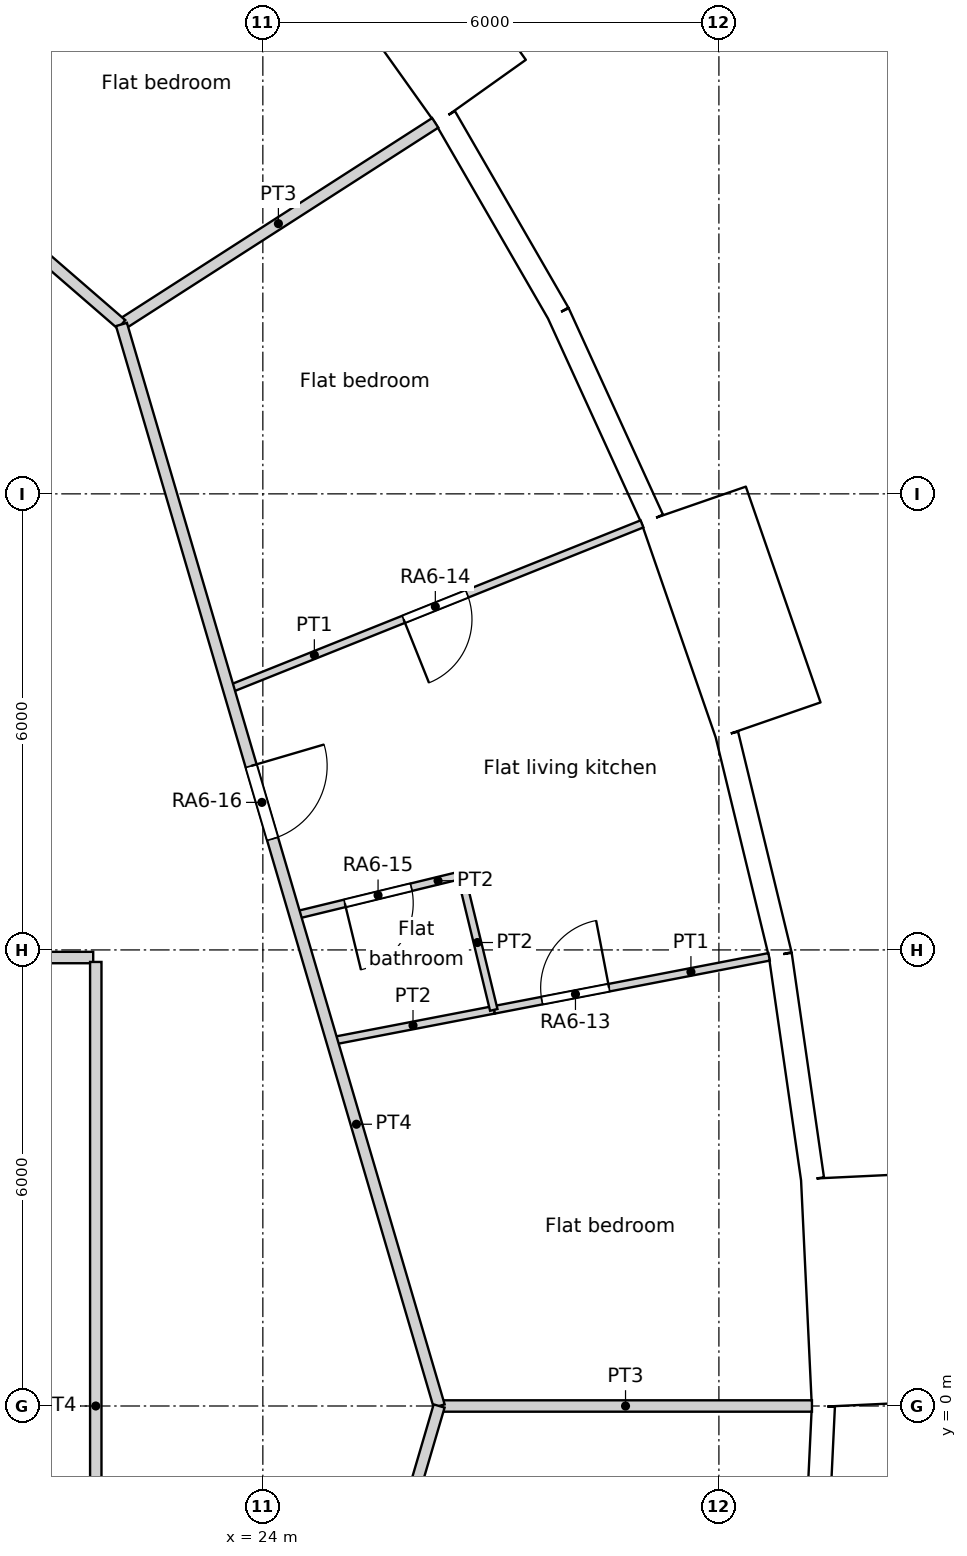
"""IFC4 building model, lengths in metres.
Left out: names, types, materials, properties, quantities, classifications, styles, units other than length and angle.
Written with IfcOpenShell. Run it as: python <this file> out.ifc"""

import sys

from ifc_helpers import new_model, si_unit, direction, frame, frame_2d, origin, origin_2d, place, context, subcontext, project, spatial, rectangle, circle, extrude, element, fill, save


model = new_model("IFC4")
c1 = context("Model", 3, precision=1e-05, world=origin(), true_north=direction((0.0, 1.0)))
c2 = subcontext(c1, "Body", "Model", "MODEL_VIEW")
j1 = project(units=[si_unit("LENGTHUNIT", "METRE"), si_unit("PLANEANGLEUNIT", "RADIAN")], contexts=[c1])
p1 = place(None, origin())
s1 = spatial("IfcSite", under=j1, at=p1, CompositionType="ELEMENT")
p2 = place(p1, origin())
s2 = spatial("IfcBuilding", under=s1, at=p2, CompositionType="ELEMENT")
p3 = place(p2, frame((0.0, 0.0, 82.2)))
s3 = spatial("IfcBuildingStorey", under=s2, at=p3, CompositionType="ELEMENT", Elevation=82.2)
for number, where, z_axis, x_axis in (
    (1, (30.275, 0.0, 0.0), (0.0, 0.0, 1.0), (1.0, 0.0, 0.0)),
    (2, (29.728, 5.729, 0.0), (0.0, 0.0, 1.0), (1.0, 0.0, 0.0)),
    (3, (28.106, 11.252, 0.0), (0.0, 0.0, 1.0), (1.0, 0.0, 0.0)),
    (4, (25.469, 16.368, 0.0), (0.0, 0.0, 1.0), (1.0, 0.0, 0.0)),
):
    element("IfcColumn", number, at=place(p3, frame(where, z_axis=z_axis, x_axis=x_axis)), inside=s3, PredefinedType="COLUMN", context=c2, shape_type="SweptSolid", body=[
        extrude(circle(Radius=0.6, at=origin_2d()), origin(), (0.0, 0.0, 1.0), 3.6),
    ])
for number, where, z_axis, x_axis in (
    (5, (24.548, 0.0, 0.0), (0.0, 0.0, 1.0), (1.0, 0.0, 0.0)),
    (6, (23.886, 5.661, 0.0), (0.0, 0.0, 1.0), (1.0, 0.0, 0.0)),
    (7, (21.937, 11.017, 0.0), (0.0, 0.0, 1.0), (1.0, 0.0, 0.0)),
):
    element("IfcColumn", number, at=place(p3, frame(where, z_axis=z_axis, x_axis=x_axis)), inside=s3, PredefinedType="COLUMN", context=c2, shape_type="SweptSolid", body=[
        extrude(circle(Radius=0.65, at=origin_2d()), origin(), (0.0, 0.0, 1.0), 3.6),
    ])
p4 = place(p3, frame((31.949, 0.02, -0.45), z_axis=(0.0, 0.0, 1.0), x_axis=(-0.047607680889, 0.998866111509, 0.0)))
e8 = element("IfcWall", 8, at=p4, inside=s3, PredefinedType="ELEMENTEDWALL", context=c2, shape_type="SweptSolid", body=[
    extrude(rectangle(XDim=3.0, YDim=1.45, at=frame_2d((1.5, 0.0))), origin(), (0.0, 0.0, 1.0), 3.6),
])
p5 = place(p4, frame((1.5, 0.0, 2.0)))
e9 = element("IfcOpeningElement", 9, at=p5, cuts=e8, PredefinedType="OPENING", context=c2, shape_type="SweptSolid", body=[
    extrude(circle(Radius=0.9, at=origin_2d()), frame((0.0, 0.735, 0.0), z_axis=(0.0, -1.0, 0.0), x_axis=(1.0, 0.0, 0.0)), (0.0, 0.0, 1.0), 1.47),
])
p6 = place(p3, frame((31.231, 2.988, 0.0), z_axis=(0.0, 0.0, 1.0), x_axis=(-0.142315996627, 0.989821275334, 0.0)))
e10 = element("IfcWall", 10, at=p6, inside=s3, PredefinedType="SOLIDWALL", context=c2, shape_type="SweptSolid", body=[
    extrude(rectangle(XDim=2.98, YDim=0.3, at=frame_2d((1.49, 0.0))), origin(), (0.0, 0.0, 1.0), 3.15),
])
p7 = place(p6, frame((1.49, 0.0, 1.55)))
e11 = element("IfcOpeningElement", 11, at=p7, cuts=e10, PredefinedType="OPENING", context=c2, shape_type="SweptSolid", body=[
    extrude(circle(Radius=0.9, at=origin_2d()), frame((0.0, 0.16, 0.0), z_axis=(0.0, -1.0, 0.0), x_axis=(1.0, 0.0, 0.0)), (0.0, 0.0, 1.0), 0.32),
])
p8 = place(p3, frame((30.807, 5.938, 0.0), z_axis=(0.0, 0.0, 1.0), x_axis=(-0.235743081534, 0.971815414319, 0.0)))
e12 = element("IfcWall", 12, at=p8, inside=s3, PredefinedType="SOLIDWALL", context=c2, shape_type="SweptSolid", body=[
    extrude(rectangle(XDim=2.979, YDim=0.3, at=frame_2d((1.49, 0.0))), origin(), (0.0, 0.0, 1.0), 3.15),
])
p9 = place(p8, frame((1.49, 0.0, 1.55)))
e13 = element("IfcOpeningElement", 13, at=p9, cuts=e12, PredefinedType="OPENING", context=c2, shape_type="SweptSolid", body=[
    extrude(circle(Radius=0.9, at=origin_2d()), frame((0.0, 0.16, 0.0), z_axis=(0.0, -1.0, 0.0), x_axis=(1.0, 0.0, 0.0)), (0.0, 0.0, 1.0), 0.32),
])
p10 = place(p3, frame((30.649, 9.021, -0.45), z_axis=(0.0, 0.0, 1.0), x_axis=(-0.327071431777, 0.944999618262, 0.0)))
e14 = element("IfcWall", 14, at=p10, inside=s3, PredefinedType="ELEMENTEDWALL", context=c2, shape_type="SweptSolid", body=[
    extrude(rectangle(XDim=3.0, YDim=1.45, at=frame_2d((1.5, 0.0))), origin(), (0.0, 0.0, 1.0), 3.6),
])
p11 = place(p10, frame((1.5, 0.0, 2.0)))
e15 = element("IfcOpeningElement", 15, at=p11, cuts=e14, PredefinedType="OPENING", context=c2, shape_type="SweptSolid", body=[
    extrude(circle(Radius=0.9, at=origin_2d()), frame((0.0, 0.735, 0.0), z_axis=(0.0, -1.0, 0.0), x_axis=(1.0, 0.0, 0.0)), (0.0, 0.0, 1.0), 1.47),
])
p12 = place(p3, frame((29.125, 11.666, 0.0), z_axis=(0.0, 0.0, 1.0), x_axis=(-0.415407317162, 0.909635509888, 0.0)))
e16 = element("IfcWall", 16, at=p12, inside=s3, PredefinedType="SOLIDWALL", context=c2, shape_type="SweptSolid", body=[
    extrude(rectangle(XDim=2.98, YDim=0.3, at=frame_2d((1.49, 0.0))), origin(), (0.0, 0.0, 1.0), 3.15),
])
p13 = place(p12, frame((1.49, 0.0, 1.55)))
e17 = element("IfcOpeningElement", 17, at=p13, cuts=e16, PredefinedType="OPENING", context=c2, shape_type="SweptSolid", body=[
    extrude(circle(Radius=0.9, at=origin_2d()), frame((0.0, 0.16, 0.0), z_axis=(0.0, -1.0, 0.0), x_axis=(1.0, 0.0, 0.0)), (0.0, 0.0, 1.0), 0.32),
])
p14 = place(p3, frame((27.887, 14.377, 0.0), z_axis=(0.0, 0.0, 1.0), x_axis=(-0.499999078476, 0.866025935826, 0.0)))
e18 = element("IfcWall", 18, at=p14, inside=s3, PredefinedType="SOLIDWALL", context=c2, shape_type="SweptSolid", body=[
    extrude(rectangle(XDim=2.979, YDim=0.3, at=frame_2d((1.49, 0.0))), origin(), (0.0, 0.0, 1.0), 3.15),
])
p15 = place(p14, frame((1.49, 0.0, 1.55)))
e19 = element("IfcOpeningElement", 19, at=p15, cuts=e18, PredefinedType="OPENING", context=c2, shape_type="SweptSolid", body=[
    extrude(circle(Radius=0.9, at=origin_2d()), frame((0.0, 0.16, 0.0), z_axis=(0.0, -1.0, 0.0), x_axis=(1.0, 0.0, 0.0)), (0.0, 0.0, 1.0), 0.32),
])
p16 = place(p3, frame((26.866, 17.29, -0.45), z_axis=(0.0, 0.0, 1.0), x_axis=(-0.580090570606, 0.814551981088, 0.0)))
e20 = element("IfcWall", 20, at=p16, inside=s3, PredefinedType="ELEMENTEDWALL", context=c2, shape_type="SweptSolid", body=[
    extrude(rectangle(XDim=3.0, YDim=1.45, at=frame_2d((1.5, 0.0))), origin(), (0.0, 0.0, 1.0), 3.6),
])
p17 = place(p16, frame((1.5, 0.0, 2.0)))
e21 = element("IfcOpeningElement", 21, at=p17, cuts=e20, PredefinedType="OPENING", context=c2, shape_type="SweptSolid", body=[
    extrude(circle(Radius=0.9, at=origin_2d()), frame((0.0, 0.735, 0.0), z_axis=(0.0, -1.0, 0.0), x_axis=(1.0, 0.0, 0.0)), (0.0, 0.0, 1.0), 1.47),
])
p18 = place(p3, frame((31.232, -2.982, 0.0), z_axis=(0.0, 0.0, 1.0), x_axis=(0.047522328113, 0.998870175914, 0.0)))
e22 = element("IfcWall", 22, at=p18, inside=s3, PredefinedType="SOLIDWALL", context=c2, shape_type="SweptSolid", body=[
    extrude(rectangle(XDim=2.98, YDim=0.3, at=frame_2d((1.49, 0.0))), origin(), (0.0, 0.0, 1.0), 3.15),
])
p19 = place(p18, frame((1.49, 0.0, 1.55)))
e23 = element("IfcOpeningElement", 23, at=p19, cuts=e22, PredefinedType="OPENING", context=c2, shape_type="SweptSolid", body=[
    extrude(circle(Radius=0.9, at=origin_2d()), frame((0.0, 0.16, 0.0), z_axis=(0.0, -1.0, 0.0), x_axis=(1.0, 0.0, 0.0)), (0.0, 0.0, 1.0), 0.32),
])
p20 = place(p3, frame((21.802, -5.842, 0.0), z_axis=(0.0, 0.0, 1.0), x_axis=(0.0, 1.0, 0.0)))
e24 = element("IfcWall", 24, at=p20, inside=s3, PredefinedType="PARTITIONING", context=c2, shape_type="SweptSolid", body=[
    extrude(rectangle(XDim=11.684, YDim=0.15, at=frame_2d((5.842, 0.0))), origin(), (0.0, 0.0, 1.0), 3.15),
])
p21 = place(p3, frame((15.8, 5.9, 0.0), z_axis=(0.0, 0.0, 1.0), x_axis=(1.0, 0.0, 0.0)))
e25 = element("IfcWall", 25, at=p21, inside=s3, PredefinedType="PARTITIONING", context=c2, shape_type="SweptSolid", body=[
    extrude(rectangle(XDim=5.968, YDim=0.15, at=frame_2d((2.984, 0.0))), origin(), (0.0, 0.0, 1.0), 3.15),
])
p22 = place(p3, frame((22.14, 14.229, 0.0), z_axis=(0.0, 0.0, 1.0), x_axis=(0.281845438276, -0.959459821422, 0.0)))
e26 = element("IfcWall", 26, at=p22, inside=s3, PredefinedType="PARTITIONING", context=c2, shape_type="SweptSolid", body=[
    extrude(rectangle(XDim=14.83, YDim=0.15, at=frame_2d((7.415, 0.0))), origin(), (0.0, 0.0, 1.0), 3.15),
])
p23 = place(p22, frame((6.053, 0.0, 0.0)))
e27 = element("IfcOpeningElement", 27, at=p23, cuts=e26, PredefinedType="OPENING", context=c2, shape_type="SweptSolid", body=[
    extrude(rectangle(XDim=1.0, YDim=2.1, at=frame_2d((0.5, 1.05))), frame((0.0, 0.075, 0.0), z_axis=(0.0, -1.0, 0.0), x_axis=(1.0, 0.0, 0.0)), (0.0, 0.0, 1.0), 0.15),
])
p24 = place(p3, frame((10.932, 23.939, 0.0), z_axis=(0.0, 0.0, 1.0), x_axis=(0.755823777664, -0.654775088956, 0.0)))
e28 = element("IfcWall", 28, at=p24, inside=s3, PredefinedType="PARTITIONING", context=c2, shape_type="SweptSolid", body=[
    extrude(rectangle(XDim=14.83, YDim=0.15, at=frame_2d((7.415, 0.0))), origin(), (0.0, 0.0, 1.0), 3.15),
])
p25 = place(p24, frame((6.604, 0.0, 0.0)))
e29 = element("IfcOpeningElement", 29, at=p25, cuts=e28, PredefinedType="OPENING", context=c2, shape_type="SweptSolid", body=[
    extrude(rectangle(XDim=1.0, YDim=2.1, at=frame_2d((0.5, 1.05))), frame((0.0, 0.075, 0.0), z_axis=(0.0, -1.0, 0.0), x_axis=(1.0, 0.0, 0.0)), (0.0, 0.0, 1.0), 0.15),
])
p26 = place(p3, frame((22.141, -14.229, 0.0), z_axis=(0.0, 0.0, 1.0), x_axis=(0.281730446162, 0.959493593363, 0.0)))
e30 = element("IfcWall", 30, at=p26, inside=s3, PredefinedType="PARTITIONING", context=c2, shape_type="SweptSolid", body=[
    extrude(rectangle(XDim=14.83, YDim=0.15, at=frame_2d((7.415, 0.0))), origin(), (0.0, 0.0, 1.0), 3.15),
])
p27 = place(p26, frame((6.665, 0.0, 0.0)))
e31 = element("IfcOpeningElement", 31, at=p27, cuts=e30, PredefinedType="OPENING", context=c2, shape_type="SweptSolid", body=[
    extrude(rectangle(XDim=1.0, YDim=2.04, at=frame_2d((0.5, 1.02))), frame((0.0, 0.075, 0.0), z_axis=(0.0, -1.0, 0.0), x_axis=(1.0, 0.0, 0.0)), (0.0, 0.0, 1.0), 0.15),
])
p28 = place(p3, frame((27.038, 5.211, 0.0), z_axis=(0.0, 0.0, 1.0), x_axis=(0.981931303506, 0.189237721384, 0.0)))
e32 = element("IfcWall", 32, at=p28, inside=s3, PredefinedType="PARTITIONING", context=c2, shape_type="SweptSolid", body=[
    extrude(rectangle(XDim=3.688, YDim=0.1, at=frame_2d((1.844, 0.0))), origin(), (0.0, 0.0, 1.0), 3.15),
])
p29 = place(p28, frame((0.645, 0.0, 0.0)))
e33 = element("IfcOpeningElement", 33, at=p29, cuts=e32, PredefinedType="OPENING", context=c2, shape_type="SweptSolid", body=[
    extrude(rectangle(XDim=0.9, YDim=2.1, at=frame_2d((0.45, 1.05))), frame((0.0, 0.05, 0.0), z_axis=(0.0, -1.0, 0.0), x_axis=(1.0, 0.0, 0.0)), (0.0, 0.0, 1.0), 0.1),
])
p30 = place(p3, frame((23.55, 9.428, 0.0), z_axis=(0.0, 0.0, 1.0), x_axis=(0.9283702981, 0.371656547911, 0.0)))
e34 = element("IfcWall", 34, at=p30, inside=s3, PredefinedType="PARTITIONING", context=c2, shape_type="SweptSolid", body=[
    extrude(rectangle(XDim=5.858, YDim=0.1, at=frame_2d((2.929, 0.0))), origin(), (0.0, 0.0, 1.0), 3.15),
])
p31 = place(p30, frame((2.479, 0.0, 0.0)))
e35 = element("IfcOpeningElement", 35, at=p31, cuts=e34, PredefinedType="OPENING", context=c2, shape_type="SweptSolid", body=[
    extrude(rectangle(XDim=0.9, YDim=2.1, at=frame_2d((0.45, 1.05))), frame((0.0, 0.05, 0.0), z_axis=(0.0, -1.0, 0.0), x_axis=(1.0, 0.0, 0.0)), (0.0, 0.0, 1.0), 0.1),
])
p32 = place(p3, frame((26.608, 6.984, 0.0), z_axis=(0.0, 0.0, 1.0), x_axis=(0.235791524639, -0.971803661708, 0.0)))
e36 = element("IfcWall", 36, at=p32, inside=s3, PredefinedType="PARTITIONING", context=c2, shape_type="SweptSolid", body=[
    extrude(rectangle(XDim=1.824, YDim=0.1, at=frame_2d((0.912, 0.0))), origin(), (0.0, 0.0, 1.0), 3.15),
])
p33 = place(p3, frame((24.424, 6.454, 0.0), z_axis=(0.0, 0.0, 1.0), x_axis=(0.971812402676, 0.235755496233, 0.0)))
e37 = element("IfcWall", 37, at=p33, inside=s3, PredefinedType="PARTITIONING", context=c2, shape_type="SweptSolid", body=[
    extrude(rectangle(XDim=2.247, YDim=0.1, at=frame_2d((1.124, 0.0))), origin(), (0.0, 0.0, 1.0), 3.15),
])
p34 = place(p33, frame((0.673, 0.0, 0.0)))
e38 = element("IfcOpeningElement", 38, at=p34, cuts=e37, PredefinedType="OPENING", context=c2, shape_type="SweptSolid", body=[
    extrude(rectangle(XDim=0.9, YDim=2.0, at=frame_2d((0.45, 1.0))), frame((0.0, 0.05, 0.0), z_axis=(0.0, -1.0, 0.0), x_axis=(1.0, 0.0, 0.0)), (0.0, 0.0, 1.0), 0.1),
])
p35 = place(p3, frame((24.909, 4.801, 0.0), z_axis=(0.0, 0.0, 1.0), x_axis=(0.981947880287, 0.189151686222, 0.0)))
e39 = element("IfcWall", 39, at=p35, inside=s3, PredefinedType="PARTITIONING", context=c2, shape_type="SweptSolid", body=[
    extrude(rectangle(XDim=2.172, YDim=0.1, at=frame_2d((1.086, 0.0))), origin(), (0.0, 0.0, 1.0), 3.15),
])
p36 = place(p3, frame((26.319, 0.0, 0.0), z_axis=(0.0, 0.0, 1.0), x_axis=(1.0, 0.0, 0.0)))
e40 = element("IfcWall", 40, at=p36, inside=s3, PredefinedType="PARTITIONING", context=c2, shape_type="SweptSolid", body=[
    extrude(rectangle(XDim=4.905, YDim=0.15, at=frame_2d((2.453, 0.0))), origin(), (0.0, 0.0, 1.0), 3.15),
])
p37 = place(p3, frame((22.141, 14.229, 0.0), z_axis=(0.0, 0.0, 1.0), x_axis=(0.841265781699, 0.540621757371, 0.0)))
e41 = element("IfcWall", 41, at=p37, inside=s3, PredefinedType="PARTITIONING", context=c2, shape_type="SweptSolid", body=[
    extrude(rectangle(XDim=4.906, YDim=0.15, at=frame_2d((2.453, 0.0))), origin(), (0.0, 0.0, 1.0), 3.15),
])
p38 = place(p5, origin())
e42 = element("IfcWindow", 42, at=p38, inside=s3, PartitioningType="SINGLE_PANEL", PredefinedType="WINDOW", context=c2, shape_type="SweptSolid", body=[
    extrude(circle(Radius=0.9, at=origin_2d()), frame((0.0, 0.695, 0.0), z_axis=(0.0, -1.0, 0.0), x_axis=(1.0, 0.0, 0.0)), (0.0, 0.0, 1.0), 0.1),
])
fill(e9, e42)
p39 = place(p7, origin())
e43 = element("IfcWindow", 43, at=p39, inside=s3, PartitioningType="SINGLE_PANEL", PredefinedType="WINDOW", context=c2, shape_type="SweptSolid", body=[
    extrude(circle(Radius=0.9, at=origin_2d()), frame((0.0, 0.12, 0.0), z_axis=(0.0, -1.0, 0.0), x_axis=(1.0, 0.0, 0.0)), (0.0, 0.0, 1.0), 0.1),
])
fill(e11, e43)
p40 = place(p9, origin())
e44 = element("IfcWindow", 44, at=p40, inside=s3, PartitioningType="SINGLE_PANEL", PredefinedType="WINDOW", context=c2, shape_type="SweptSolid", body=[
    extrude(circle(Radius=0.9, at=origin_2d()), frame((0.0, 0.12, 0.0), z_axis=(0.0, -1.0, 0.0), x_axis=(1.0, 0.0, 0.0)), (0.0, 0.0, 1.0), 0.1),
])
fill(e13, e44)
p41 = place(p11, origin())
e45 = element("IfcWindow", 45, at=p41, inside=s3, PartitioningType="SINGLE_PANEL", PredefinedType="WINDOW", context=c2, shape_type="SweptSolid", body=[
    extrude(circle(Radius=0.9, at=origin_2d()), frame((0.0, 0.695, 0.0), z_axis=(0.0, -1.0, 0.0), x_axis=(1.0, 0.0, 0.0)), (0.0, 0.0, 1.0), 0.1),
])
fill(e15, e45)
p42 = place(p13, origin())
e46 = element("IfcWindow", 46, at=p42, inside=s3, PartitioningType="SINGLE_PANEL", PredefinedType="WINDOW", context=c2, shape_type="SweptSolid", body=[
    extrude(circle(Radius=0.9, at=origin_2d()), frame((0.0, 0.12, 0.0), z_axis=(0.0, -1.0, 0.0), x_axis=(1.0, 0.0, 0.0)), (0.0, 0.0, 1.0), 0.1),
])
fill(e17, e46)
p43 = place(p15, origin())
e47 = element("IfcWindow", 47, at=p43, inside=s3, PartitioningType="SINGLE_PANEL", PredefinedType="WINDOW", context=c2, shape_type="SweptSolid", body=[
    extrude(circle(Radius=0.9, at=origin_2d()), frame((0.0, 0.12, 0.0), z_axis=(0.0, -1.0, 0.0), x_axis=(1.0, 0.0, 0.0)), (0.0, 0.0, 1.0), 0.1),
])
fill(e19, e47)
p44 = place(p17, origin())
e48 = element("IfcWindow", 48, at=p44, inside=s3, PartitioningType="SINGLE_PANEL", PredefinedType="WINDOW", context=c2, shape_type="SweptSolid", body=[
    extrude(circle(Radius=0.9, at=origin_2d()), frame((0.0, 0.695, 0.0), z_axis=(0.0, -1.0, 0.0), x_axis=(1.0, 0.0, 0.0)), (0.0, 0.0, 1.0), 0.1),
])
fill(e21, e48)
p45 = place(p19, origin())
e49 = element("IfcWindow", 49, at=p45, inside=s3, PartitioningType="SINGLE_PANEL", PredefinedType="WINDOW", context=c2, shape_type="SweptSolid", body=[
    extrude(circle(Radius=0.9, at=origin_2d()), frame((0.0, 0.12, 0.0), z_axis=(0.0, -1.0, 0.0), x_axis=(1.0, 0.0, 0.0)), (0.0, 0.0, 1.0), 0.1),
])
fill(e23, e49)
p46 = place(p29, origin())
e50 = element("IfcDoor", 50, at=p46, inside=s3, OperationType="SINGLE_SWING_RIGHT", PredefinedType="DOOR", context=c2, shape_type="SweptSolid", body=[
    extrude(rectangle(XDim=0.9, YDim=2.1, at=frame_2d((0.45, 1.05))), frame((0.0, 0.025, 0.0), z_axis=(0.0, -1.0, 0.0), x_axis=(1.0, 0.0, 0.0)), (0.0, 0.0, 1.0), 0.05),
])
fill(e33, e50)
p47 = place(p31, origin())
e51 = element("IfcDoor", 51, at=p47, inside=s3, OperationType="SINGLE_SWING_RIGHT", PredefinedType="DOOR", context=c2, shape_type="SweptSolid", body=[
    extrude(rectangle(XDim=0.9, YDim=2.1, at=frame_2d((0.45, 1.05))), frame((0.0, 0.025, 0.0), z_axis=(0.0, -1.0, 0.0), x_axis=(1.0, 0.0, 0.0)), (0.0, 0.0, 1.0), 0.05),
])
fill(e35, e51)
p48 = place(p34, origin())
e52 = element("IfcDoor", 52, at=p48, inside=s3, OperationType="SINGLE_SWING_RIGHT", PredefinedType="DOOR", context=c2, shape_type="SweptSolid", body=[
    extrude(rectangle(XDim=0.9, YDim=2.0, at=frame_2d((0.45, 1.0))), frame((0.0, 0.025, 0.0), z_axis=(0.0, -1.0, 0.0), x_axis=(1.0, 0.0, 0.0)), (0.0, 0.0, 1.0), 0.05),
])
fill(e38, e52)
p49 = place(p23, origin())
e53 = element("IfcDoor", 53, at=p49, inside=s3, OperationType="SINGLE_SWING_LEFT", PredefinedType="DOOR", context=c2, shape_type="SweptSolid", body=[
    extrude(rectangle(XDim=1.0, YDim=2.1, at=frame_2d((0.5, 1.05))), frame((0.0, 0.025, 0.0), z_axis=(0.0, -1.0, 0.0), x_axis=(1.0, 0.0, 0.0)), (0.0, 0.0, 1.0), 0.05),
])
fill(e27, e53)
save(model, sys.argv[1])
